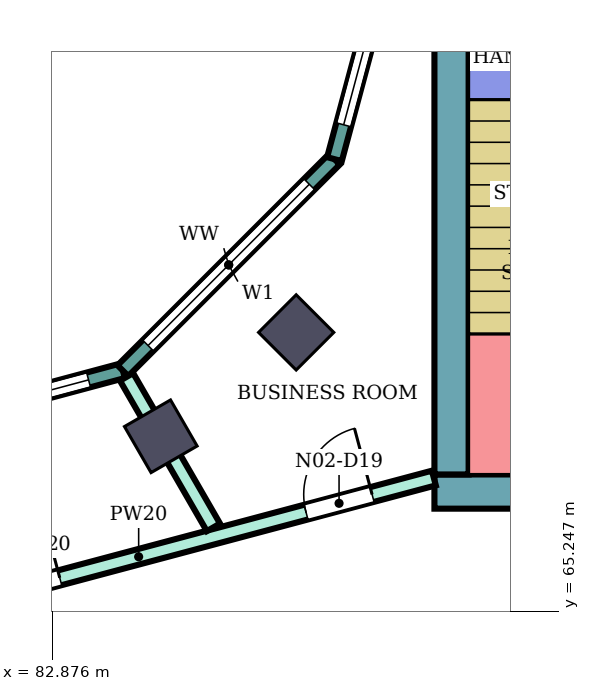
"""IFC4 building model, lengths in metres.
Left out: names, types, materials, properties, quantities, classifications, styles, units other than length and angle.
Written with IfcOpenShell. Run it as: python <this file> out.ifc"""

import sys

from ifc_helpers import new_model, si_unit, direction, frame, frame_2d, origin, origin_2d, place, context, subcontext, project, spatial, rectangle, extrude, element, fill, save


model = new_model("IFC4")
c1 = context("Model", 3, precision=1e-05, world=origin(), true_north=direction((0.0, 1.0)))
c2 = subcontext(c1, "Body", "Model", "MODEL_VIEW")
j1 = project(units=[si_unit("LENGTHUNIT", "METRE"), si_unit("PLANEANGLEUNIT", "RADIAN")], contexts=[c1])
p1 = place(None, origin())
s1 = spatial("IfcSite", under=j1, at=p1, CompositionType="ELEMENT")
p2 = place(p1, origin())
s2 = spatial("IfcBuilding", under=s1, at=p2, CompositionType="ELEMENT")
p3 = place(p2, frame((0.0, 0.0, 288.3)))
s3 = spatial("IfcBuildingStorey", under=s2, at=p3, CompositionType="ELEMENT", Elevation=288.3)
for number, where, z_axis, x_axis in (
    (1, (84.3, 67.552, 0.0), (0.0, 0.0, 1.0), (0.5, -0.866, 0.0)),
    (2, (86.081, 68.919, 0.0), (0.0, 0.0, 1.0), (0.707, -0.707, 0.0)),
):
    element("IfcColumn", number, at=place(p3, frame(where, z_axis=z_axis, x_axis=x_axis)), inside=s3, PredefinedType="COLUMN", context=c2, shape_type="SweptSolid", body=[
        extrude(rectangle(XDim=0.7, YDim=0.7, at=origin_2d()), origin(), (0.0, 0.0, 1.0), 4.2),
    ])
p4 = place(p3, frame((87.9, 66.825, 0.0), z_axis=(0.0, 0.0, 1.0), x_axis=(1.0, 0.0, 0.0)))
e3 = element("IfcWall", 3, at=p4, inside=s3, PredefinedType="SHEAR", context=c2, shape_type="SweptSolid", body=[
    extrude(rectangle(XDim=13.55, YDim=0.45, at=frame_2d((6.775, 0.0))), origin(), (0.0, 0.0, 1.0), 3.88),
])
p5 = place(p4, frame((4.2, 0.0, 0.0)))
e4 = element("IfcOpeningElement", 4, at=p5, cuts=e3, PredefinedType="OPENING", context=c2, shape_type="SweptSolid", body=[
    extrude(rectangle(XDim=2.4, YDim=2.4, at=frame_2d((1.2, 1.2))), frame((0.0, 0.235, 0.0), z_axis=(0.0, -1.0, 0.0), x_axis=(1.0, 0.0, 0.0)), (0.0, 0.0, 1.0), 0.47),
])
p6 = place(p3, frame((88.125, 67.05, 0.0), z_axis=(0.0, 0.0, 1.0), x_axis=(0.0, 1.0, 0.0)))
e5 = element("IfcWall", 5, at=p6, inside=s3, PredefinedType="SHEAR", context=c2, shape_type="SweptSolid", body=[
    extrude(rectangle(XDim=7.95, YDim=0.45, at=frame_2d((3.975, 0.0))), origin(), (0.0, 0.0, 1.0), 3.88),
])
p7 = place(p3, frame((80.0, 67.396, 0.0), z_axis=(0.0, 0.0, 1.0), x_axis=(0.965933654434, 0.258789828301, 0.0)))
e6 = element("IfcWall", 6, at=p7, inside=s3, PredefinedType="NOTDEFINED", context=c2, shape_type="SweptSolid", body=[
    extrude(rectangle(XDim=3.936, YDim=0.2, at=frame_2d((1.968, 0.0))), origin(), (0.0, 0.0, 1.0), 4.2),
])
p8 = place(p7, frame((0.468, 0.0, 0.9)))
e7 = element("IfcOpeningElement", 7, at=p8, cuts=e6, PredefinedType="OPENING", context=c2, shape_type="SweptSolid", body=[
    extrude(rectangle(XDim=3.0, YDim=2.3, at=frame_2d((1.5, 1.15))), frame((0.0, 0.11, 0.0), z_axis=(0.0, -1.0, 0.0), x_axis=(1.0, 0.0, 0.0)), (0.0, 0.0, 1.0), 0.22),
])
p9 = place(p3, frame((83.802, 68.415, 0.0), z_axis=(0.0, 0.0, 1.0), x_axis=(0.707106781187, 0.707106781187, 0.0)))
e8 = element("IfcWall", 8, at=p9, inside=s3, PredefinedType="NOTDEFINED", context=c2, shape_type="SweptSolid", body=[
    extrude(rectangle(XDim=3.936, YDim=0.2, at=frame_2d((1.968, 0.0))), origin(), (0.0, 0.0, 1.0), 4.2),
])
p10 = place(p9, frame((0.468, 0.0, 0.9)))
e9 = element("IfcOpeningElement", 9, at=p10, cuts=e8, PredefinedType="OPENING", context=c2, shape_type="SweptSolid", body=[
    extrude(rectangle(XDim=3.0, YDim=2.3, at=frame_2d((1.5, 1.15))), frame((0.0, 0.11, 0.0), z_axis=(0.0, -1.0, 0.0), x_axis=(1.0, 0.0, 0.0)), (0.0, 0.0, 1.0), 0.22),
])
p11 = place(p3, frame((86.585, 71.198, 0.0), z_axis=(0.0, 0.0, 1.0), x_axis=(0.258789828301, 0.965933654434, 0.0)))
e10 = element("IfcWall", 10, at=p11, inside=s3, PredefinedType="NOTDEFINED", context=c2, shape_type="SweptSolid", body=[
    extrude(rectangle(XDim=3.936, YDim=0.2, at=frame_2d((1.968, 0.0))), origin(), (0.0, 0.0, 1.0), 4.2),
])
p12 = place(p11, frame((0.468, 0.0, 0.9)))
e11 = element("IfcOpeningElement", 11, at=p12, cuts=e10, PredefinedType="OPENING", context=c2, shape_type="SweptSolid", body=[
    extrude(rectangle(XDim=3.0, YDim=2.3, at=frame_2d((1.5, 1.15))), frame((0.0, 0.11, 0.0), z_axis=(0.0, -1.0, 0.0), x_axis=(1.0, 0.0, 0.0)), (0.0, 0.0, 1.0), 0.22),
])
p13 = place(p3, frame((80.125, 64.932, 0.0), z_axis=(0.0, 0.0, 1.0), x_axis=(0.966236955806, 0.257655089674, 0.0)))
e12 = element("IfcWall", 12, at=p13, inside=s3, PredefinedType="PARTITIONING", context=c2, shape_type="SweptSolid", body=[
    extrude(rectangle(XDim=8.039, YDim=0.2, at=frame_2d((4.02, 0.0))), origin(), (0.0, 0.0, 1.0), 3.75),
])
p14 = place(p13, frame((6.298, 0.0, 0.0)))
e13 = element("IfcOpeningElement", 13, at=p14, cuts=e12, PredefinedType="OPENING", context=c2, shape_type="SweptSolid", body=[
    extrude(rectangle(XDim=0.9, YDim=2.1, at=frame_2d((0.45, 1.05))), frame((0.0, 0.11, 0.0), z_axis=(0.0, -1.0, 0.0), x_axis=(1.0, 0.0, 0.0)), (0.0, 0.0, 1.0), 0.22),
])
p15 = place(p13, frame((2.045, 0.0, 0.0)))
e14 = element("IfcOpeningElement", 14, at=p15, cuts=e12, PredefinedType="OPENING", context=c2, shape_type="SweptSolid", body=[
    extrude(rectangle(XDim=0.9, YDim=2.1, at=frame_2d((0.45, 1.05))), frame((0.0, 0.11, 0.0), z_axis=(0.0, -1.0, 0.0), x_axis=(1.0, 0.0, 0.0)), (0.0, 0.0, 1.0), 0.22),
])
p16 = place(p3, frame((83.85, 68.333, 0.0), z_axis=(0.0, 0.0, 1.0), x_axis=(0.500080019051, -0.865979199835, 0.0)))
e15 = element("IfcWall", 15, at=p16, inside=s3, PredefinedType="PARTITIONING", context=c2, shape_type="SweptSolid", body=[
    extrude(rectangle(XDim=2.285, YDim=0.2, at=frame_2d((1.143, 0.0))), origin(), (0.0, 0.0, 1.0), 3.75),
])
p17 = place(p3, frame((86.053, 63.826, 0.0), z_axis=(0.0, 0.0, 1.0), x_axis=(0.969480070232, 0.245170131586, 0.0)))
e16 = element("IfcWall", 16, at=p17, inside=s3, PredefinedType="PARTITIONING", context=c2, shape_type="SweptSolid", body=[
    extrude(rectangle(XDim=5.907, YDim=0.2, at=frame_2d((2.954, 0.0))), origin(), (0.0, 0.0, 1.0), 3.75),
])
p18 = place(p8, origin())
e17 = element("IfcWindow", 17, at=p18, inside=s3, PartitioningType="SINGLE_PANEL", PredefinedType="WINDOW", context=c2, shape_type="SweptSolid", body=[
    extrude(rectangle(XDim=3.0, YDim=2.3, at=frame_2d((1.5, 1.15))), frame((0.0, 0.03, 0.0), z_axis=(0.0, -1.0, 0.0), x_axis=(1.0, 0.0, 0.0)), (0.0, 0.0, 1.0), 0.06),
])
fill(e7, e17)
p19 = place(p10, origin())
e18 = element("IfcWindow", 18, at=p19, inside=s3, PartitioningType="SINGLE_PANEL", PredefinedType="WINDOW", context=c2, shape_type="SweptSolid", body=[
    extrude(rectangle(XDim=3.0, YDim=2.3, at=frame_2d((1.5, 1.15))), frame((0.0, 0.03, 0.0), z_axis=(0.0, -1.0, 0.0), x_axis=(1.0, 0.0, 0.0)), (0.0, 0.0, 1.0), 0.06),
])
fill(e9, e18)
p20 = place(p12, origin())
e19 = element("IfcWindow", 19, at=p20, inside=s3, PartitioningType="SINGLE_PANEL", PredefinedType="WINDOW", context=c2, shape_type="SweptSolid", body=[
    extrude(rectangle(XDim=3.0, YDim=2.3, at=frame_2d((1.5, 1.15))), frame((0.0, 0.03, 0.0), z_axis=(0.0, -1.0, 0.0), x_axis=(1.0, 0.0, 0.0)), (0.0, 0.0, 1.0), 0.06),
])
fill(e11, e19)
p21 = place(p14, origin())
e20 = element("IfcDoor", 20, at=p21, inside=s3, OperationType="SINGLE_SWING_RIGHT", PredefinedType="DOOR", context=c2, shape_type="SweptSolid", body=[
    extrude(rectangle(XDim=0.9, YDim=2.1, at=frame_2d((0.45, 1.05))), frame((0.0, 0.025, 0.0), z_axis=(0.0, -1.0, 0.0), x_axis=(1.0, 0.0, 0.0)), (0.0, 0.0, 1.0), 0.05),
])
fill(e13, e20)
p22 = place(p15, origin())
e21 = element("IfcDoor", 21, at=p22, inside=s3, OperationType="SINGLE_SWING_RIGHT", PredefinedType="DOOR", context=c2, shape_type="SweptSolid", body=[
    extrude(rectangle(XDim=0.9, YDim=2.1, at=frame_2d((0.45, 1.05))), frame((0.0, 0.025, 0.0), z_axis=(0.0, -1.0, 0.0), x_axis=(1.0, 0.0, 0.0)), (0.0, 0.0, 1.0), 0.05),
])
fill(e14, e21)
save(model, sys.argv[1])
